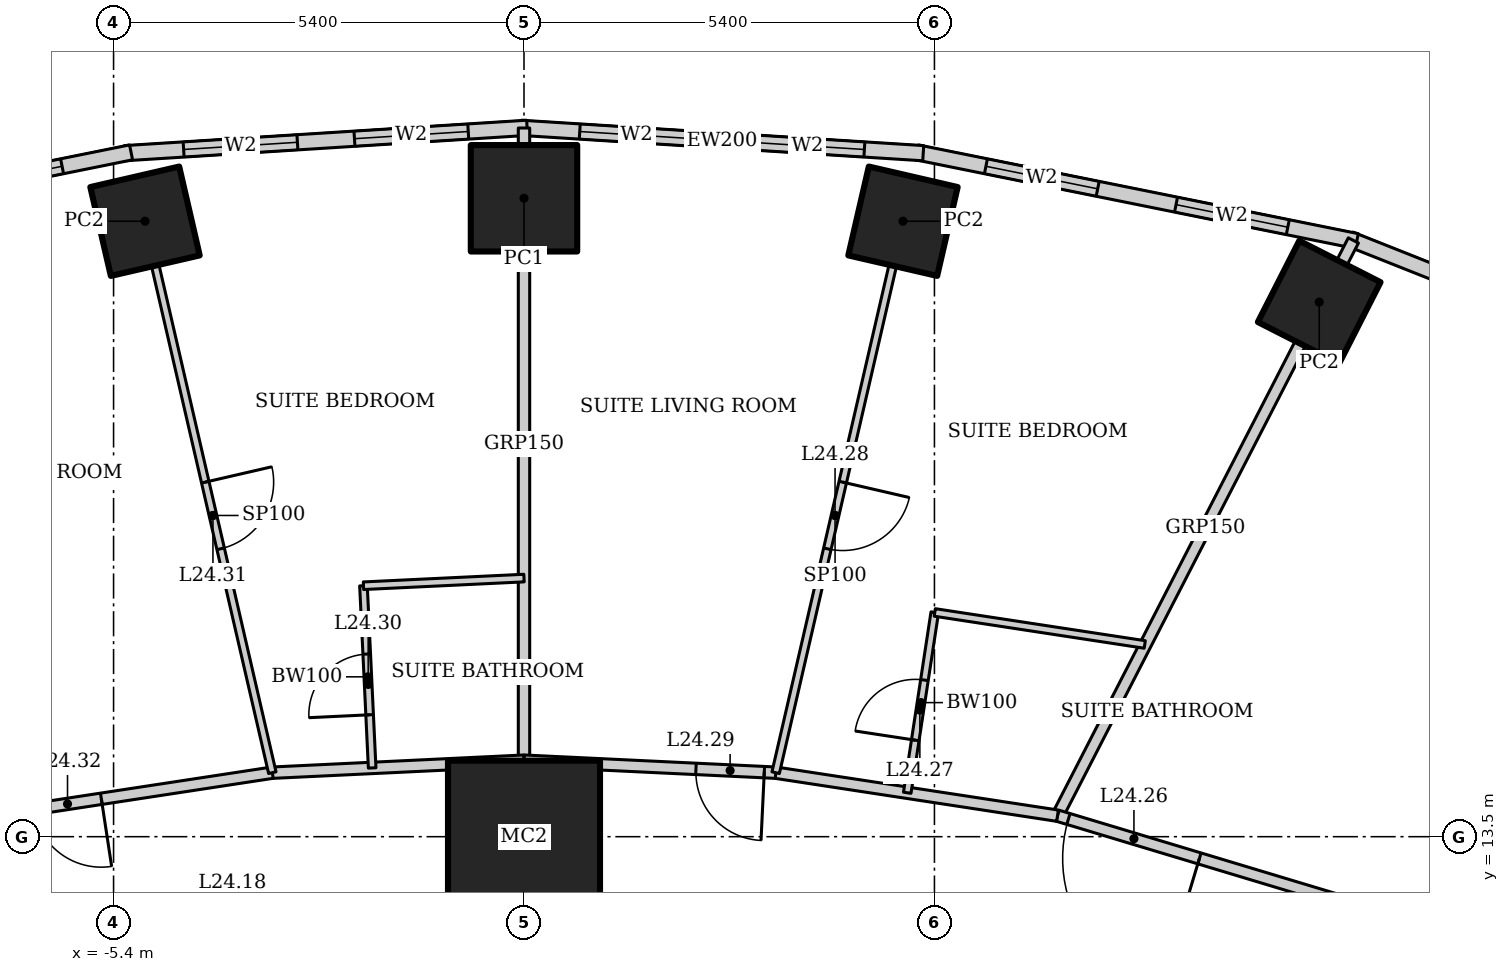
"""IFC4 building model, lengths in metres.
Left out: names, types, materials, properties, quantities, classifications, styles, units other than length and angle.
Written with IfcOpenShell. Run it as: python <this file> out.ifc"""

import sys

from ifc_helpers import new_model, si_unit, direction, frame, frame_2d, origin, origin_2d, place, context, subcontext, project, spatial, rectangle, hollow_rectangle, extrude, element, fill, save


model = new_model("IFC4")
c1 = context("Model", 3, precision=1e-05, world=origin(), true_north=direction((0.0, 1.0)))
c2 = subcontext(c1, "Body", "Model", "MODEL_VIEW")
j1 = project(units=[si_unit("LENGTHUNIT", "METRE"), si_unit("PLANEANGLEUNIT", "RADIAN")], contexts=[c1])
p1 = place(None, origin())
s1 = spatial("IfcSite", under=j1, at=p1, CompositionType="ELEMENT")
p2 = place(p1, origin())
s2 = spatial("IfcBuilding", under=s1, at=p2, CompositionType="ELEMENT")
p3 = place(p2, frame((0.0, 0.0, 101.8)))
s3 = spatial("IfcBuildingStorey", under=s2, at=p3, CompositionType="ELEMENT", Elevation=101.8)
p4 = place(p3, frame((0.0, 13.5, 0.0), z_axis=(0.0, 0.0, 1.0), x_axis=(1.0, 0.0, 0.0)))
e1 = element("IfcColumn", 1, at=p4, inside=s3, PredefinedType="COLUMN", context=c2, shape_type="SweptSolid", body=[
    extrude(hollow_rectangle(XDim=2.0, YDim=2.0, WallThickness=0.17, at=origin_2d()), origin(), (0.0, 0.0, 1.0), 3.6),
])
for number, where, z_axis, x_axis in (
    (2, (10.463, 20.534, 0.0), (0.0, 0.0, 1.0), (0.454, 0.891, 0.0)),
    (3, (4.986, 21.598, 0.0), (0.0, 0.0, 1.0), (0.225, 0.974, 0.0)),
):
    element("IfcColumn", number, at=place(p3, frame(where, z_axis=z_axis, x_axis=x_axis)), inside=s3, PredefinedType="COLUMN", context=c2, shape_type="SweptSolid", body=[
        extrude(hollow_rectangle(XDim=1.2, YDim=1.2, WallThickness=0.1, at=origin_2d()), origin(), (0.0, 0.0, 1.0), 2.28),
    ])
p5 = place(p3, frame((0.0, 21.9, 0.0), z_axis=(0.0, 0.0, 1.0), x_axis=(1.0, 0.0, 0.0)))
e4 = element("IfcColumn", 4, at=p5, inside=s3, PredefinedType="COLUMN", context=c2, shape_type="SweptSolid", body=[
    extrude(hollow_rectangle(XDim=1.4, YDim=1.4, WallThickness=0.1, at=origin_2d()), origin(), (0.0, 0.0, 1.0), 2.06),
])
p6 = place(p3, frame((-4.986, 21.598, 0.0), z_axis=(0.0, 0.0, 1.0), x_axis=(0.974370064785, 0.224951054344, 0.0)))
e5 = element("IfcColumn", 5, at=p6, inside=s3, PredefinedType="COLUMN", context=c2, shape_type="SweptSolid", body=[
    extrude(hollow_rectangle(XDim=1.2, YDim=1.2, WallThickness=0.1, at=origin_2d()), origin(), (0.0, 0.0, 1.0), 2.28),
])
p7 = place(p3, frame((18.018, 18.523, 0.0), z_axis=(0.0, 0.0, 1.0), x_axis=(-0.929358351251, 0.369178892895, 0.0)))
e6 = element("IfcWall", 6, at=p7, inside=s3, PredefinedType="SOLIDWALL", context=c2, shape_type="SweptSolid", body=[
    extrude(rectangle(XDim=7.692, YDim=0.2, at=frame_2d((3.846, 0.0))), origin(), (0.0, 0.0, 1.0), 3.4),
])
p8 = place(p7, frame((1.373, 0.0, 0.5)))
e7 = element("IfcOpeningElement", 7, at=p8, cuts=e6, PredefinedType="OPENING", context=c2, shape_type="SweptSolid", body=[
    extrude(rectangle(XDim=1.5, YDim=2.2, at=frame_2d((0.75, 1.1))), frame((0.0, 0.11, 0.0), z_axis=(0.0, -1.0, 0.0), x_axis=(1.0, 0.0, 0.0)), (0.0, 0.0, 1.0), 0.22),
])
p9 = place(p7, frame((4.819, 0.0, 0.5)))
e8 = element("IfcOpeningElement", 8, at=p9, cuts=e6, PredefinedType="OPENING", context=c2, shape_type="SweptSolid", body=[
    extrude(rectangle(XDim=1.5, YDim=2.2, at=frame_2d((0.75, 1.1))), frame((0.0, 0.11, 0.0), z_axis=(0.0, -1.0, 0.0), x_axis=(1.0, 0.0, 0.0)), (0.0, 0.0, 1.0), 0.22),
])
p10 = place(p3, frame((10.957, 21.337, 0.0), z_axis=(0.0, 0.0, 1.0), x_axis=(-0.980251657452, 0.197754110105, 0.0)))
e9 = element("IfcWall", 9, at=p10, inside=s3, PredefinedType="SOLIDWALL", context=c2, shape_type="SweptSolid", body=[
    extrude(rectangle(XDim=5.904, YDim=0.2, at=frame_2d((2.952, 0.0))), origin(), (0.0, 0.0, 1.0), 3.4),
])
p11 = place(p10, frame((0.926, 0.0, 0.5)))
e10 = element("IfcOpeningElement", 10, at=p11, cuts=e9, PredefinedType="OPENING", context=c2, shape_type="SweptSolid", body=[
    extrude(rectangle(XDim=1.5, YDim=2.2, at=frame_2d((0.75, 1.1))), frame((0.0, 0.11, 0.0), z_axis=(0.0, -1.0, 0.0), x_axis=(1.0, 0.0, 0.0)), (0.0, 0.0, 1.0), 0.22),
])
p12 = place(p10, frame((3.478, 0.0, 0.5)))
e11 = element("IfcOpeningElement", 11, at=p12, cuts=e9, PredefinedType="OPENING", context=c2, shape_type="SweptSolid", body=[
    extrude(rectangle(XDim=1.5, YDim=2.2, at=frame_2d((0.75, 1.1))), frame((0.0, 0.11, 0.0), z_axis=(0.0, -1.0, 0.0), x_axis=(1.0, 0.0, 0.0)), (0.0, 0.0, 1.0), 0.22),
])
p13 = place(p3, frame((5.253, 22.493, 0.0), z_axis=(0.0, 0.0, 1.0), x_axis=(-0.998018582375, 0.062919863585, 0.0)))
e12 = element("IfcWall", 12, at=p13, inside=s3, PredefinedType="SOLIDWALL", context=c2, shape_type="SweptSolid", body=[
    extrude(rectangle(XDim=5.304, YDim=0.2, at=frame_2d((2.652, 0.0))), origin(), (0.0, 0.0, 1.0), 3.4),
])
p14 = place(p13, frame((0.776, 0.0, 0.5)))
e13 = element("IfcOpeningElement", 13, at=p14, cuts=e12, PredefinedType="OPENING", context=c2, shape_type="SweptSolid", body=[
    extrude(rectangle(XDim=1.5, YDim=2.2, at=frame_2d((0.75, 1.1))), frame((0.0, 0.11, 0.0), z_axis=(0.0, -1.0, 0.0), x_axis=(1.0, 0.0, 0.0)), (0.0, 0.0, 1.0), 0.22),
])
p15 = place(p13, frame((3.028, 0.0, 0.5)))
e14 = element("IfcOpeningElement", 14, at=p15, cuts=e12, PredefinedType="OPENING", context=c2, shape_type="SweptSolid", body=[
    extrude(rectangle(XDim=1.5, YDim=2.2, at=frame_2d((0.75, 1.1))), frame((0.0, 0.11, 0.0), z_axis=(0.0, -1.0, 0.0), x_axis=(1.0, 0.0, 0.0)), (0.0, 0.0, 1.0), 0.22),
])
p16 = place(p3, frame((0.041, 22.827, 0.0), z_axis=(0.0, 0.0, 1.0), x_axis=(-0.998018582375, -0.062919863585, 0.0)))
e15 = element("IfcWall", 15, at=p16, inside=s3, PredefinedType="SOLIDWALL", context=c2, shape_type="SweptSolid", body=[
    extrude(rectangle(XDim=5.304, YDim=0.2, at=frame_2d((2.652, 0.0))), origin(), (0.0, 0.0, 1.0), 3.4),
])
p17 = place(p16, frame((0.776, 0.0, 0.5)))
e16 = element("IfcOpeningElement", 16, at=p17, cuts=e15, PredefinedType="OPENING", context=c2, shape_type="SweptSolid", body=[
    extrude(rectangle(XDim=1.5, YDim=2.2, at=frame_2d((0.75, 1.1))), frame((0.0, 0.11, 0.0), z_axis=(0.0, -1.0, 0.0), x_axis=(1.0, 0.0, 0.0)), (0.0, 0.0, 1.0), 0.22),
])
p18 = place(p16, frame((3.028, 0.0, 0.5)))
e17 = element("IfcOpeningElement", 17, at=p18, cuts=e15, PredefinedType="OPENING", context=c2, shape_type="SweptSolid", body=[
    extrude(rectangle(XDim=1.5, YDim=2.2, at=frame_2d((0.75, 1.1))), frame((0.0, 0.11, 0.0), z_axis=(0.0, -1.0, 0.0), x_axis=(1.0, 0.0, 0.0)), (0.0, 0.0, 1.0), 0.22),
])
p19 = place(p3, frame((-5.17, 22.504, 0.0), z_axis=(0.0, 0.0, 1.0), x_axis=(-0.980251657452, -0.197754110105, 0.0)))
e18 = element("IfcWall", 18, at=p19, inside=s3, PredefinedType="SOLIDWALL", context=c2, shape_type="SweptSolid", body=[
    extrude(rectangle(XDim=5.904, YDim=0.2, at=frame_2d((2.952, 0.0))), origin(), (0.0, 0.0, 1.0), 3.4),
])
p20 = place(p19, frame((0.926, 0.0, 0.5)))
e19 = element("IfcOpeningElement", 19, at=p20, cuts=e18, PredefinedType="OPENING", context=c2, shape_type="SweptSolid", body=[
    extrude(rectangle(XDim=1.5, YDim=2.2, at=frame_2d((0.75, 1.1))), frame((0.0, 0.11, 0.0), z_axis=(0.0, -1.0, 0.0), x_axis=(1.0, 0.0, 0.0)), (0.0, 0.0, 1.0), 0.22),
])
p21 = place(p19, frame((3.478, 0.0, 0.5)))
e20 = element("IfcOpeningElement", 20, at=p21, cuts=e18, PredefinedType="OPENING", context=c2, shape_type="SweptSolid", body=[
    extrude(rectangle(XDim=1.5, YDim=2.2, at=frame_2d((0.75, 1.1))), frame((0.0, 0.11, 0.0), z_axis=(0.0, -1.0, 0.0), x_axis=(1.0, 0.0, 0.0)), (0.0, 0.0, 1.0), 0.22),
])
p22 = place(p3, frame((10.912, 21.346, 0.0), z_axis=(0.0, 0.0, 1.0), x_axis=(-0.457327273085, -0.889298468059, 0.0)))
e21 = element("IfcWall", 21, at=p22, inside=s3, PredefinedType="PARTITIONING", context=c2, shape_type="SweptSolid", body=[
    extrude(rectangle(XDim=8.511, YDim=0.15, at=frame_2d((4.256, 0.0))), origin(), (0.0, 0.0, 1.0), 2.463),
])
p23 = place(p3, frame((0.0, 22.825, 0.0), z_axis=(0.0, 0.0, 1.0), x_axis=(0.0, -1.0, 0.0)))
e22 = element("IfcWall", 22, at=p23, inside=s3, PredefinedType="PARTITIONING", context=c2, shape_type="SweptSolid", body=[
    extrude(rectangle(XDim=8.325, YDim=0.15, at=frame_2d((4.162, 0.0))), origin(), (0.0, 0.0, 1.0), 2.2),
])
p24 = place(p3, frame((11.888, 12.311, 0.0), z_axis=(0.0, 0.0, 1.0), x_axis=(-0.957564241242, 0.288219922793, 0.0)))
e23 = element("IfcWall", 23, at=p24, inside=s3, PredefinedType="PARTITIONING", context=c2, shape_type="SweptSolid", body=[
    extrude(rectangle(XDim=5.085, YDim=0.15, at=frame_2d((2.542, 0.0))), origin(), (0.0, 0.0, 1.0), 3.4),
])
p25 = place(p24, frame((3.135, 0.0, 0.0)))
e24 = element("IfcOpeningElement", 24, at=p25, cuts=e23, PredefinedType="OPENING", context=c2, shape_type="SweptSolid", body=[
    extrude(rectangle(XDim=1.8, YDim=2.1, at=frame_2d((0.9, 1.05))), frame((0.0, 0.085, 0.0), z_axis=(0.0, -1.0, 0.0), x_axis=(1.0, 0.0, 0.0)), (0.0, 0.0, 1.0), 0.17),
])
p26 = place(p3, frame((7.019, 13.776, 0.0), z_axis=(0.0, 0.0, 1.0), x_axis=(-0.988564270062, 0.150800145746, 0.0)))
e25 = element("IfcWall", 25, at=p26, inside=s3, PredefinedType="PARTITIONING", context=c2, shape_type="SweptSolid", body=[
    extrude(rectangle(XDim=3.751, YDim=0.15, at=frame_2d((1.875, 0.0))), origin(), (0.0, 0.0, 1.0), 3.4),
])
p27 = place(p3, frame((3.311, 14.342, 0.0), z_axis=(0.0, 0.0, 1.0), x_axis=(-0.998863968075, 0.047652631422, 0.0)))
e26 = element("IfcWall", 26, at=p27, inside=s3, PredefinedType="PARTITIONING", context=c2, shape_type="SweptSolid", body=[
    extrude(rectangle(XDim=3.315, YDim=0.15, at=frame_2d((1.657, 0.0))), origin(), (0.0, 0.0, 1.0), 3.4),
])
p28 = place(p27, frame((0.15, 0.0, 0.0)))
e27 = element("IfcOpeningElement", 27, at=p28, cuts=e26, PredefinedType="OPENING", context=c2, shape_type="SweptSolid", body=[
    extrude(rectangle(XDim=0.9, YDim=2.1, at=frame_2d((0.45, 1.05))), frame((0.0, 0.085, 0.0), z_axis=(0.0, -1.0, 0.0), x_axis=(1.0, 0.0, 0.0)), (0.0, 0.0, 1.0), 0.17),
])
p29 = place(p3, frame((0.0, 14.5, 0.0), z_axis=(0.0, 0.0, 1.0), x_axis=(-0.998863968075, -0.047652631422, 0.0)))
e28 = element("IfcWall", 28, at=p29, inside=s3, PredefinedType="PARTITIONING", context=c2, shape_type="SweptSolid", body=[
    extrude(rectangle(XDim=3.315, YDim=0.15, at=frame_2d((1.657, 0.0))), origin(), (0.0, 0.0, 1.0), 3.4),
])
p30 = place(p3, frame((-3.311, 14.342, 0.0), z_axis=(0.0, 0.0, 1.0), x_axis=(-0.988564270062, -0.150800145746, 0.0)))
e29 = element("IfcWall", 29, at=p30, inside=s3, PredefinedType="PARTITIONING", context=c2, shape_type="SweptSolid", body=[
    extrude(rectangle(XDim=3.751, YDim=0.15, at=frame_2d((1.875, 0.0))), origin(), (0.0, 0.0, 1.0), 3.4),
])
p31 = place(p30, frame((2.276, 0.0, 0.0)))
e30 = element("IfcOpeningElement", 30, at=p31, cuts=e29, PredefinedType="OPENING", context=c2, shape_type="SweptSolid", body=[
    extrude(rectangle(XDim=0.9, YDim=2.1, at=frame_2d((0.45, 1.05))), frame((0.0, 0.085, 0.0), z_axis=(0.0, -1.0, 0.0), x_axis=(1.0, 0.0, 0.0)), (0.0, 0.0, 1.0), 0.17),
])
p32 = place(p3, frame((5.042, 14.078, 0.0), z_axis=(0.0, 0.0, 1.0), x_axis=(0.150856962013, 0.988555601376, 0.0)))
e31 = element("IfcWall", 31, at=p32, inside=s3, PredefinedType="PARTITIONING", context=c2, shape_type="SweptSolid", body=[
    extrude(rectangle(XDim=2.4, YDim=0.1, at=frame_2d((1.2, 0.0))), origin(), (0.0, 0.0, 1.0), 3.4),
])
p33 = place(p32, frame((0.7, 0.0, 0.0)))
e32 = element("IfcOpeningElement", 32, at=p33, cuts=e31, PredefinedType="OPENING", context=c2, shape_type="SweptSolid", body=[
    extrude(rectangle(XDim=0.8, YDim=2.1, at=frame_2d((0.4, 1.05))), frame((0.0, 0.06, 0.0), z_axis=(0.0, -1.0, 0.0), x_axis=(1.0, 0.0, 0.0)), (0.0, 0.0, 1.0), 0.12),
])
p34 = place(p3, frame((5.404, 16.45, 0.0), z_axis=(0.0, 0.0, 1.0), x_axis=(0.988568792086, -0.150770498819, 0.0)))
e33 = element("IfcWall", 33, at=p34, inside=s3, PredefinedType="PARTITIONING", context=c2, shape_type="SweptSolid", body=[
    extrude(rectangle(XDim=2.795, YDim=0.1, at=frame_2d((1.397, 0.0))), origin(), (0.0, 0.0, 1.0), 3.4),
])
p35 = place(p3, frame((4.874, 21.111, 0.0), z_axis=(0.0, 0.0, 1.0), x_axis=(-0.224957040173, -0.974368682828, 0.0)))
e34 = element("IfcWall", 34, at=p35, inside=s3, PredefinedType="PARTITIONING", context=c2, shape_type="SweptSolid", body=[
    extrude(rectangle(XDim=6.947, YDim=0.1, at=frame_2d((3.473, 0.0))), origin(), (0.0, 0.0, 1.0), 2.554),
])
p36 = place(p35, frame((3.023, 0.0, 0.0)))
e35 = element("IfcOpeningElement", 35, at=p36, cuts=e34, PredefinedType="OPENING", context=c2, shape_type="SweptSolid", body=[
    extrude(rectangle(XDim=0.9, YDim=2.1, at=frame_2d((0.45, 1.05))), frame((0.0, 0.06, 0.0), z_axis=(0.0, -1.0, 0.0), x_axis=(1.0, 0.0, 0.0)), (0.0, 0.0, 1.0), 0.12),
])
p37 = place(p3, frame((-1.998, 14.405, 0.0), z_axis=(0.0, 0.0, 1.0), x_axis=(-0.047608648396, 0.998866065395, 0.0)))
e36 = element("IfcWall", 36, at=p37, inside=s3, PredefinedType="PARTITIONING", context=c2, shape_type="SweptSolid", body=[
    extrude(rectangle(XDim=2.4, YDim=0.1, at=frame_2d((1.2, 0.0))), origin(), (0.0, 0.0, 1.0), 2.628),
])
p38 = place(p37, frame((0.7, 0.0, 0.0)))
e37 = element("IfcOpeningElement", 37, at=p38, cuts=e36, PredefinedType="OPENING", context=c2, shape_type="SweptSolid", body=[
    extrude(rectangle(XDim=0.8, YDim=2.1, at=frame_2d((0.4, 1.05))), frame((0.0, 0.06, 0.0), z_axis=(0.0, -1.0, 0.0), x_axis=(1.0, 0.0, 0.0)), (0.0, 0.0, 1.0), 0.12),
])
p39 = place(p3, frame((-2.112, 16.802, 0.0), z_axis=(0.0, 0.0, 1.0), x_axis=(0.998862383453, 0.047685835668, 0.0)))
e38 = element("IfcWall", 38, at=p39, inside=s3, PredefinedType="PARTITIONING", context=c2, shape_type="SweptSolid", body=[
    extrude(rectangle(XDim=2.115, YDim=0.1, at=frame_2d((1.057, 0.0))), origin(), (0.0, 0.0, 1.0), 3.4),
])
p40 = place(p3, frame((-4.874, 21.111, 0.0), z_axis=(0.0, 0.0, 1.0), x_axis=(0.224957040173, -0.974368682828, 0.0)))
e39 = element("IfcWall", 39, at=p40, inside=s3, PredefinedType="PARTITIONING", context=c2, shape_type="SweptSolid", body=[
    extrude(rectangle(XDim=6.947, YDim=0.1, at=frame_2d((3.473, 0.0))), origin(), (0.0, 0.0, 1.0), 2.554),
])
p41 = place(p40, frame((3.023, 0.0, 0.0)))
e40 = element("IfcOpeningElement", 40, at=p41, cuts=e39, PredefinedType="OPENING", context=c2, shape_type="SweptSolid", body=[
    extrude(rectangle(XDim=0.9, YDim=2.1, at=frame_2d((0.45, 1.05))), frame((0.0, 0.06, 0.0), z_axis=(0.0, -1.0, 0.0), x_axis=(1.0, 0.0, 0.0)), (0.0, 0.0, 1.0), 0.12),
])
p42 = place(p11, origin())
e41 = element("IfcWindow", 41, at=p42, inside=s3, PartitioningType="SINGLE_PANEL", PredefinedType="WINDOW", context=c2, shape_type="SweptSolid", body=[
    extrude(rectangle(XDim=1.5, YDim=2.2, at=frame_2d((0.75, 1.1))), frame((0.0, 0.03, 0.0), z_axis=(0.0, -1.0, 0.0), x_axis=(1.0, 0.0, 0.0)), (0.0, 0.0, 1.0), 0.06),
])
fill(e10, e41)
p43 = place(p12, origin())
e42 = element("IfcWindow", 42, at=p43, inside=s3, PartitioningType="SINGLE_PANEL", PredefinedType="WINDOW", context=c2, shape_type="SweptSolid", body=[
    extrude(rectangle(XDim=1.5, YDim=2.2, at=frame_2d((0.75, 1.1))), frame((0.0, 0.03, 0.0), z_axis=(0.0, -1.0, 0.0), x_axis=(1.0, 0.0, 0.0)), (0.0, 0.0, 1.0), 0.06),
])
fill(e11, e42)
p44 = place(p14, origin())
e43 = element("IfcWindow", 43, at=p44, inside=s3, PartitioningType="SINGLE_PANEL", PredefinedType="WINDOW", context=c2, shape_type="SweptSolid", body=[
    extrude(rectangle(XDim=1.5, YDim=2.2, at=frame_2d((0.75, 1.1))), frame((0.0, 0.03, 0.0), z_axis=(0.0, -1.0, 0.0), x_axis=(1.0, 0.0, 0.0)), (0.0, 0.0, 1.0), 0.06),
])
fill(e13, e43)
p45 = place(p15, origin())
e44 = element("IfcWindow", 44, at=p45, inside=s3, PartitioningType="SINGLE_PANEL", PredefinedType="WINDOW", context=c2, shape_type="SweptSolid", body=[
    extrude(rectangle(XDim=1.5, YDim=2.2, at=frame_2d((0.75, 1.1))), frame((0.0, 0.03, 0.0), z_axis=(0.0, -1.0, 0.0), x_axis=(1.0, 0.0, 0.0)), (0.0, 0.0, 1.0), 0.06),
])
fill(e14, e44)
p46 = place(p17, origin())
e45 = element("IfcWindow", 45, at=p46, inside=s3, PartitioningType="SINGLE_PANEL", PredefinedType="WINDOW", context=c2, shape_type="SweptSolid", body=[
    extrude(rectangle(XDim=1.5, YDim=2.2, at=frame_2d((0.75, 1.1))), frame((0.0, 0.03, 0.0), z_axis=(0.0, -1.0, 0.0), x_axis=(1.0, 0.0, 0.0)), (0.0, 0.0, 1.0), 0.06),
])
fill(e16, e45)
p47 = place(p18, origin())
e46 = element("IfcWindow", 46, at=p47, inside=s3, PartitioningType="SINGLE_PANEL", PredefinedType="WINDOW", context=c2, shape_type="SweptSolid", body=[
    extrude(rectangle(XDim=1.5, YDim=2.2, at=frame_2d((0.75, 1.1))), frame((0.0, 0.03, 0.0), z_axis=(0.0, -1.0, 0.0), x_axis=(1.0, 0.0, 0.0)), (0.0, 0.0, 1.0), 0.06),
])
fill(e17, e46)
p48 = place(p20, origin())
e47 = element("IfcWindow", 47, at=p48, inside=s3, PartitioningType="SINGLE_PANEL", PredefinedType="WINDOW", context=c2, shape_type="SweptSolid", body=[
    extrude(rectangle(XDim=1.5, YDim=2.2, at=frame_2d((0.75, 1.1))), frame((0.0, 0.03, 0.0), z_axis=(0.0, -1.0, 0.0), x_axis=(1.0, 0.0, 0.0)), (0.0, 0.0, 1.0), 0.06),
])
fill(e19, e47)
p49 = place(p25, origin())
e48 = element("IfcDoor", 48, at=p49, inside=s3, OperationType="DOUBLE_DOOR_DOUBLE_SWING", PredefinedType="DOOR", context=c2, shape_type="SweptSolid", body=[
    extrude(rectangle(XDim=1.8, YDim=2.1, at=frame_2d((0.9, 1.05))), frame((0.0, 0.025, 0.0), z_axis=(0.0, -1.0, 0.0), x_axis=(1.0, 0.0, 0.0)), (0.0, 0.0, 1.0), 0.05),
])
fill(e24, e48)
p50 = place(p33, origin())
e49 = element("IfcDoor", 49, at=p50, inside=s3, OperationType="SINGLE_SWING_LEFT", PredefinedType="DOOR", context=c2, shape_type="SweptSolid", body=[
    extrude(rectangle(XDim=0.8, YDim=2.1, at=frame_2d((0.4, 1.05))), frame((0.0, 0.025, 0.0), z_axis=(0.0, -1.0, 0.0), x_axis=(1.0, 0.0, 0.0)), (0.0, 0.0, 1.0), 0.05),
])
fill(e32, e49)
p51 = place(p36, origin())
e50 = element("IfcDoor", 50, at=p51, inside=s3, OperationType="SINGLE_SWING_LEFT", PredefinedType="DOOR", context=c2, shape_type="SweptSolid", body=[
    extrude(rectangle(XDim=0.9, YDim=2.1, at=frame_2d((0.45, 1.05))), frame((0.0, 0.025, 0.0), z_axis=(0.0, -1.0, 0.0), x_axis=(1.0, 0.0, 0.0)), (0.0, 0.0, 1.0), 0.05),
])
fill(e35, e50)
p52 = place(p28, origin())
e51 = element("IfcDoor", 51, at=p52, inside=s3, OperationType="SINGLE_SWING_LEFT", PredefinedType="DOOR", context=c2, shape_type="SweptSolid", body=[
    extrude(rectangle(XDim=0.9, YDim=2.1, at=frame_2d((0.45, 1.05))), frame((0.0, 0.025, 0.0), z_axis=(0.0, -1.0, 0.0), x_axis=(1.0, 0.0, 0.0)), (0.0, 0.0, 1.0), 0.05),
])
fill(e27, e51)
p53 = place(p38, origin())
e52 = element("IfcDoor", 52, at=p53, inside=s3, OperationType="SINGLE_SWING_LEFT", PredefinedType="DOOR", context=c2, shape_type="SweptSolid", body=[
    extrude(rectangle(XDim=0.8, YDim=2.1, at=frame_2d((0.4, 1.05))), frame((0.0, 0.025, 0.0), z_axis=(0.0, -1.0, 0.0), x_axis=(1.0, 0.0, 0.0)), (0.0, 0.0, 1.0), 0.05),
])
fill(e37, e52)
p54 = place(p41, origin())
e53 = element("IfcDoor", 53, at=p54, inside=s3, OperationType="SINGLE_SWING_LEFT", PredefinedType="DOOR", context=c2, shape_type="SweptSolid", body=[
    extrude(rectangle(XDim=0.9, YDim=2.1, at=frame_2d((0.45, 1.05))), frame((0.0, 0.025, 0.0), z_axis=(0.0, -1.0, 0.0), x_axis=(1.0, 0.0, 0.0)), (0.0, 0.0, 1.0), 0.05),
])
fill(e40, e53)
p55 = place(p31, origin())
e54 = element("IfcDoor", 54, at=p55, inside=s3, OperationType="SINGLE_SWING_LEFT", PredefinedType="DOOR", context=c2, shape_type="SweptSolid", body=[
    extrude(rectangle(XDim=0.9, YDim=2.1, at=frame_2d((0.45, 1.05))), frame((0.0, 0.025, 0.0), z_axis=(0.0, -1.0, 0.0), x_axis=(1.0, 0.0, 0.0)), (0.0, 0.0, 1.0), 0.05),
])
fill(e30, e54)
save(model, sys.argv[1])
